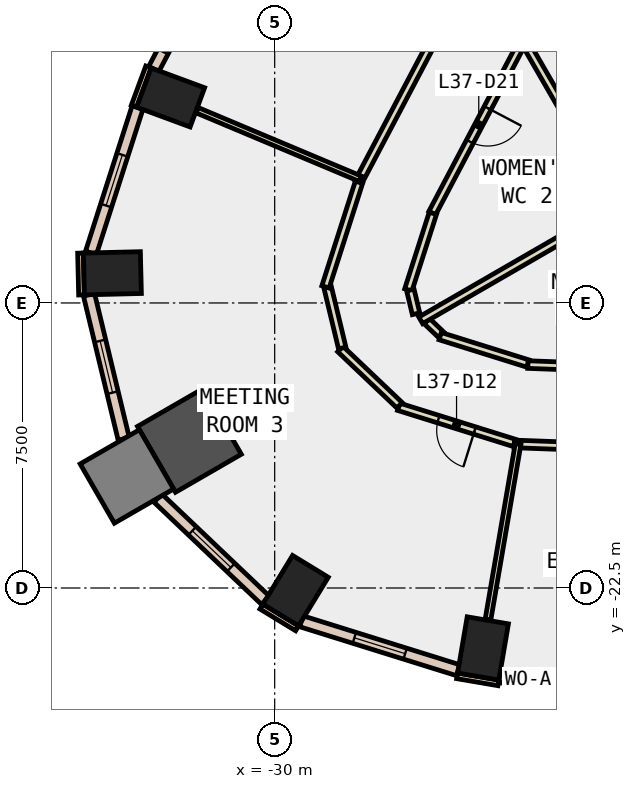
"""IFC4 building model, lengths in metres.
Left out: names, types, materials, properties, quantities, classifications, styles, units other than length and angle.
Written with IfcOpenShell. Run it as: python <this file> out.ifc"""

import sys

from ifc_helpers import new_model, si_unit, direction, frame, frame_2d, origin, origin_2d, place, context, subcontext, project, spatial, rectangle, extrude, element, fill, save


model = new_model("IFC4")
c1 = context("Model", 3, precision=1e-05, world=origin(), true_north=direction((0.0, 1.0)))
c2 = subcontext(c1, "Body", "Model", "MODEL_VIEW")
j1 = project(units=[si_unit("LENGTHUNIT", "METRE"), si_unit("PLANEANGLEUNIT", "RADIAN")], contexts=[c1])
p1 = place(None, origin())
s1 = spatial("IfcSite", under=j1, at=p1, CompositionType="ELEMENT")
p2 = place(p1, origin())
s2 = spatial("IfcBuilding", under=s1, at=p2, CompositionType="ELEMENT")
p3 = place(p2, frame((0.0, 0.0, 167.6)))
s3 = spatial("IfcBuildingStorey", under=s2, at=p3, CompositionType="ELEMENT", Elevation=167.6)
for number, where, z_axis, x_axis in (
    (1, (-24.518, -24.09, -0.4), (0.0, 0.0, 1.0), (-0.986, 0.168, 0.0)),
    (2, (-32.738, -9.593, -0.4), (0.0, 0.0, 1.0), (0.347, 0.938, 0.0)),
    (3, (-34.271, -14.219, -0.4), (0.0, 0.0, 1.0), (-0.024, 1.0, 0.0)),
):
    element("IfcColumn", number, at=place(p3, frame(where, z_axis=z_axis, x_axis=x_axis)), inside=s3, PredefinedType="COLUMN", context=c2, shape_type="SweptSolid", body=[
        extrude(rectangle(XDim=1.1, YDim=1.5, at=origin_2d()), origin(), (0.0, 0.0, 1.0), 4.2),
    ])
p4 = place(p3, frame((-32.244, -18.615, -0.4), z_axis=(0.0, 0.0, 1.0), x_axis=(0.866025403784, 0.5, 0.0)))
e4 = element("IfcColumn", 4, at=p4, inside=s3, PredefinedType="COLUMN", context=c2, shape_type="SweptSolid", body=[
    extrude(rectangle(XDim=2.0, YDim=2.0, at=origin_2d()), origin(), (0.0, 0.0, 1.0), 4.2),
])
p5 = place(p3, frame((-29.45, -22.571, -0.4), z_axis=(0.0, 0.0, 1.0), x_axis=(-0.853714435155, 0.520741455243, 0.0)))
e5 = element("IfcColumn", 5, at=p5, inside=s3, PredefinedType="COLUMN", context=c2, shape_type="SweptSolid", body=[
    extrude(rectangle(XDim=1.1, YDim=1.5, at=origin_2d()), origin(), (0.0, 0.0, 1.0), 4.2),
])
p6 = place(p3, frame((-33.889, -19.565, -0.4), z_axis=(0.0, 0.0, 1.0), x_axis=(0.866025403784, 0.5, 0.0)))
e6 = element("IfcColumn", 6, at=p6, inside=s3, PredefinedType="COLUMN", context=c2, shape_type="SweptSolid", body=[
    extrude(rectangle(XDim=1.8, YDim=1.8, at=origin_2d()), origin(), (0.0, 0.0, 1.0), 4.2),
])
p7 = place(p3, frame((-33.321, -8.791, 0.0), z_axis=(0.0, 0.0, 1.0), x_axis=(-0.346229846278, -0.938149718087, 0.0)))
e7 = element("IfcWall", 7, at=p7, inside=s3, PredefinedType="STANDARD", context=c2, shape_type="SweptSolid", body=[
    extrude(rectangle(XDim=1.1, YDim=0.15, at=frame_2d((0.55, 0.0))), origin(), (0.0, 0.0, 1.0), 3.8),
])
p8 = place(p3, frame((-25.199, -24.811, 0.0), z_axis=(0.0, 0.0, 1.0), x_axis=(0.985763338892, -0.168138751323, 0.0)))
e8 = element("IfcWall", 8, at=p8, inside=s3, PredefinedType="STANDARD", context=c2, shape_type="SweptSolid", body=[
    extrude(rectangle(XDim=1.101, YDim=0.15, at=frame_2d((0.55, 0.0))), origin(), (0.0, 0.0, 1.0), 3.8),
])
p9 = place(p3, frame((-35.109, -13.689, 0.0), z_axis=(0.0, 0.0, 1.0), x_axis=(0.023517683673, -0.999723421029, 0.0)))
e9 = element("IfcWall", 9, at=p9, inside=s3, PredefinedType="STANDARD", context=c2, shape_type="SweptSolid", body=[
    extrude(rectangle(XDim=1.1, YDim=0.15, at=frame_2d((0.55, 0.0))), origin(), (0.0, 0.0, 1.0), 3.8),
])
p10 = place(p3, frame((-30.349, -22.989, 0.0), z_axis=(0.0, 0.0, 1.0), x_axis=(0.854065628997, -0.520165263514, 0.0)))
e10 = element("IfcWall", 10, at=p10, inside=s3, PredefinedType="STANDARD", context=c2, shape_type="SweptSolid", body=[
    extrude(rectangle(XDim=1.1, YDim=0.15, at=frame_2d((0.55, 0.0))), origin(), (0.0, 0.0, 1.0), 3.8),
])
p11 = place(p3, frame((-24.09, -24.848, 0.0), z_axis=(0.0, 0.0, 1.0), x_axis=(0.999307730926, -0.037202942236, 0.0)))
e11 = element("IfcWall", 11, at=p11, inside=s3, PredefinedType="STANDARD", context=c2, shape_type="SweptSolid", body=[
    extrude(rectangle(XDim=7.317, YDim=0.3, at=frame_2d((3.659, 0.0))), origin(), (0.0, 0.0, 1.0), 3.8),
])
p12 = place(p11, frame((0.629, 0.0, 0.9)))
e12 = element("IfcOpeningElement", 12, at=p12, cuts=e11, PredefinedType="OPENING", context=c2, shape_type="SweptSolid", body=[
    extrude(rectangle(XDim=2.4, YDim=2.6, at=frame_2d((1.2, 1.3))), frame((0.0, 0.16, 0.0), z_axis=(0.0, -1.0, 0.0), x_axis=(1.0, 0.0, 0.0)), (0.0, 0.0, 1.0), 0.32),
])
p13 = place(p11, frame((4.288, 0.0, 0.9)))
e13 = element("IfcOpeningElement", 13, at=p13, cuts=e11, PredefinedType="OPENING", context=c2, shape_type="SweptSolid", body=[
    extrude(rectangle(XDim=2.4, YDim=2.6, at=frame_2d((1.2, 1.3))), frame((0.0, 0.16, 0.0), z_axis=(0.0, -1.0, 0.0), x_axis=(1.0, 0.0, 0.0)), (0.0, 0.0, 1.0), 0.32),
])
p14 = place(p3, frame((-30.358, -3.488, 0.0), z_axis=(0.0, 0.0, 1.0), x_axis=(-0.466399410196, -0.884574242316, 0.0)))
e14 = element("IfcWall", 14, at=p14, inside=s3, PredefinedType="STANDARD", context=c2, shape_type="SweptSolid", body=[
    extrude(rectangle(XDim=6.055, YDim=0.3, at=frame_2d((3.027, 0.0))), origin(), (0.0, 0.0, 1.0), 3.8),
])
p15 = place(p14, frame((0.514, 0.0, 0.9)))
e15 = element("IfcOpeningElement", 15, at=p15, cuts=e14, PredefinedType="OPENING", context=c2, shape_type="SweptSolid", body=[
    extrude(rectangle(XDim=2.0, YDim=2.6, at=frame_2d((1.0, 1.3))), frame((0.0, 0.16, 0.0), z_axis=(0.0, -1.0, 0.0), x_axis=(1.0, 0.0, 0.0)), (0.0, 0.0, 1.0), 0.32),
])
p16 = place(p14, frame((3.541, 0.0, 0.9)))
e16 = element("IfcOpeningElement", 16, at=p16, cuts=e14, PredefinedType="OPENING", context=c2, shape_type="SweptSolid", body=[
    extrude(rectangle(XDim=2.0, YDim=2.6, at=frame_2d((1.0, 1.3))), frame((0.0, 0.16, 0.0), z_axis=(0.0, -1.0, 0.0), x_axis=(1.0, 0.0, 0.0)), (0.0, 0.0, 1.0), 0.32),
])
p17 = place(p3, frame((-33.609, -9.856, 0.0), z_axis=(0.0, 0.0, 1.0), x_axis=(-0.305018133869, -0.952346543025, 0.0)))
e17 = element("IfcWall", 17, at=p17, inside=s3, PredefinedType="STANDARD", context=c2, shape_type="SweptSolid", body=[
    extrude(rectangle(XDim=4.02, YDim=0.3, at=frame_2d((2.01, 0.0))), origin(), (0.0, 0.0, 1.0), 3.8),
])
p18 = place(p17, frame((1.31, 0.0, 0.9)))
e18 = element("IfcOpeningElement", 18, at=p18, cuts=e17, PredefinedType="OPENING", context=c2, shape_type="SweptSolid", body=[
    extrude(rectangle(XDim=1.4, YDim=2.6, at=frame_2d((0.7, 1.3))), frame((0.0, 0.16, 0.0), z_axis=(0.0, -1.0, 0.0), x_axis=(1.0, 0.0, 0.0)), (0.0, 0.0, 1.0), 0.32),
])
p19 = place(p3, frame((-34.886, -14.783, 0.0), z_axis=(0.0, 0.0, 1.0), x_axis=(0.234102046927, -0.972212030179, 0.0)))
e19 = element("IfcWall", 19, at=p19, inside=s3, PredefinedType="STANDARD", context=c2, shape_type="SweptSolid", body=[
    extrude(rectangle(XDim=3.9, YDim=0.3, at=frame_2d((1.95, 0.0))), origin(), (0.0, 0.0, 1.0), 3.8),
])
p20 = place(p19, frame((1.25, 0.0, 0.9)))
e20 = element("IfcOpeningElement", 20, at=p20, cuts=e19, PredefinedType="OPENING", context=c2, shape_type="SweptSolid", body=[
    extrude(rectangle(XDim=1.4, YDim=2.6, at=frame_2d((0.7, 1.3))), frame((0.0, 0.16, 0.0), z_axis=(0.0, -1.0, 0.0), x_axis=(1.0, 0.0, 0.0)), (0.0, 0.0, 1.0), 0.32),
])
p21 = place(p3, frame((-33.074, -20.133, 0.0), z_axis=(0.0, 0.0, 1.0), x_axis=(0.724807239831, -0.688951714628, 0.0)))
e21 = element("IfcWall", 21, at=p21, inside=s3, PredefinedType="STANDARD", context=c2, shape_type="SweptSolid", body=[
    extrude(rectangle(XDim=3.902, YDim=0.3, at=frame_2d((1.951, 0.0))), origin(), (0.0, 0.0, 1.0), 3.8),
])
p22 = place(p21, frame((1.251, 0.0, 0.9)))
e22 = element("IfcOpeningElement", 22, at=p22, cuts=e21, PredefinedType="OPENING", context=c2, shape_type="SweptSolid", body=[
    extrude(rectangle(XDim=1.4, YDim=2.6, at=frame_2d((0.7, 1.3))), frame((0.0, 0.16, 0.0), z_axis=(0.0, -1.0, 0.0), x_axis=(1.0, 0.0, 0.0)), (0.0, 0.0, 1.0), 0.32),
])
p23 = place(p3, frame((-29.298, -23.376, 0.0), z_axis=(0.0, 0.0, 1.0), x_axis=(0.954628614874, -0.29779893832, 0.0)))
e23 = element("IfcWall", 23, at=p23, inside=s3, PredefinedType="STANDARD", context=c2, shape_type="SweptSolid", body=[
    extrude(rectangle(XDim=4.322, YDim=0.3, at=frame_2d((2.161, 0.0))), origin(), (0.0, 0.0, 1.0), 3.8),
])
p24 = place(p23, frame((1.461, 0.0, 0.9)))
e24 = element("IfcOpeningElement", 24, at=p24, cuts=e23, PredefinedType="OPENING", context=c2, shape_type="SweptSolid", body=[
    extrude(rectangle(XDim=1.4, YDim=2.6, at=frame_2d((0.7, 1.3))), frame((0.0, 0.16, 0.0), z_axis=(0.0, -1.0, 0.0), x_axis=(1.0, 0.0, 0.0)), (0.0, 0.0, 1.0), 0.32),
])
p25 = place(p3, frame((-23.406, -7.991, 0.0), z_axis=(0.0, 0.0, 1.0), x_axis=(-0.466307932558, -0.884622468646, 0.0)))
e25 = element("IfcWall", 25, at=p25, inside=s3, PredefinedType="PARTITIONING", context=c2, shape_type="SweptSolid", body=[
    extrude(rectangle(XDim=5.25, YDim=0.2, at=frame_2d((2.625, 0.0))), origin(), (0.0, 0.0, 1.0), 3.8),
])
p26 = place(p25, frame((2.125, 0.0, 0.0)))
e26 = element("IfcOpeningElement", 26, at=p26, cuts=e25, PredefinedType="OPENING", context=c2, shape_type="SweptSolid", body=[
    extrude(rectangle(XDim=1.0, YDim=2.1, at=frame_2d((0.5, 1.05))), frame((0.0, 0.11, 0.0), z_axis=(0.0, -1.0, 0.0), x_axis=(1.0, 0.0, 0.0)), (0.0, 0.0, 1.0), 0.22),
])
p27 = place(p3, frame((-25.838, -12.642, 0.0), z_axis=(0.0, 0.0, 1.0), x_axis=(-0.305169069368, -0.952298188122, 0.0)))
e27 = element("IfcWall", 27, at=p27, inside=s3, PredefinedType="PARTITIONING", context=c2, shape_type="SweptSolid", body=[
    extrude(rectangle(XDim=2.117, YDim=0.2, at=frame_2d((1.059, 0.0))), origin(), (0.0, 0.0, 1.0), 3.8),
])
p28 = place(p3, frame((-26.43, -14.66, 0.0), z_axis=(0.0, 0.0, 1.0), x_axis=(0.233574377125, -0.972338938, 0.0)))
e28 = element("IfcWall", 28, at=p28, inside=s3, PredefinedType="PARTITIONING", context=c2, shape_type="SweptSolid", body=[
    extrude(rectangle(XDim=0.642, YDim=0.2, at=frame_2d((0.321, 0.0))), origin(), (0.0, 0.0, 1.0), 3.8),
])
p29 = place(p3, frame((-25.998, -15.476, 0.0), z_axis=(0.0, 0.0, 1.0), x_axis=(0.724294499657, -0.689490737985, 0.0)))
e29 = element("IfcWall", 29, at=p29, inside=s3, PredefinedType="PARTITIONING", context=c2, shape_type="SweptSolid", body=[
    extrude(rectangle(XDim=0.519, YDim=0.2, at=frame_2d((0.26, 0.0))), origin(), (0.0, 0.0, 1.0), 3.8),
])
p30 = place(p3, frame((-25.645, -15.873, 0.0), z_axis=(0.0, 0.0, 1.0), x_axis=(0.95454810771, -0.298056890655, 0.0)))
e30 = element("IfcWall", 30, at=p30, inside=s3, PredefinedType="PARTITIONING", context=c2, shape_type="SweptSolid", body=[
    extrude(rectangle(XDim=2.422, YDim=0.2, at=frame_2d((1.211, 0.0))), origin(), (0.0, 0.0, 1.0), 3.8),
])
p31 = place(p3, frame((-23.337, -16.621, 0.0), z_axis=(0.0, 0.0, 1.0), x_axis=(0.999311710526, -0.037095892019, 0.0)))
e31 = element("IfcWall", 31, at=p31, inside=s3, PredefinedType="PARTITIONING", context=c2, shape_type="SweptSolid", body=[
    extrude(rectangle(XDim=4.824, YDim=0.2, at=frame_2d((2.412, 0.0))), origin(), (0.0, 0.0, 1.0), 3.8),
])
p32 = place(p31, frame((1.913, 0.0, 0.0)))
e32 = element("IfcOpeningElement", 32, at=p32, cuts=e31, PredefinedType="OPENING", context=c2, shape_type="SweptSolid", body=[
    extrude(rectangle(XDim=1.0, YDim=2.1, at=frame_2d((0.5, 1.05))), frame((0.0, 0.11, 0.0), z_axis=(0.0, -1.0, 0.0), x_axis=(1.0, 0.0, 0.0)), (0.0, 0.0, 1.0), 0.22),
])
p33 = place(p3, frame((-27.798, -11.819, 0.0), z_axis=(0.0, 0.0, 1.0), x_axis=(0.466450727507, 0.884547182918, 0.0)))
e33 = element("IfcWall", 33, at=p33, inside=s3, PredefinedType="PARTITIONING", context=c2, shape_type="SweptSolid", body=[
    extrude(rectangle(XDim=6.685, YDim=0.2, at=frame_2d((3.342, 0.0))), origin(), (0.0, 0.0, 1.0), 3.8),
])
p34 = place(p3, frame((-23.691, -18.683, 0.0), z_axis=(0.0, 0.0, 1.0), x_axis=(-0.954546657381, 0.298061535398, 0.0)))
e34 = element("IfcWall", 34, at=p34, inside=s3, PredefinedType="PARTITIONING", context=c2, shape_type="SweptSolid", body=[
    extrude(rectangle(XDim=3.191, YDim=0.2, at=frame_2d((1.596, 0.0))), origin(), (0.0, 0.0, 1.0), 3.8),
])
p35 = place(p34, frame((1.096, 0.0, 0.0)))
e35 = element("IfcOpeningElement", 35, at=p35, cuts=e34, PredefinedType="OPENING", context=c2, shape_type="SweptSolid", body=[
    extrude(rectangle(XDim=1.0, YDim=2.1, at=frame_2d((0.5, 1.05))), frame((0.0, 0.11, 0.0), z_axis=(0.0, -1.0, 0.0), x_axis=(1.0, 0.0, 0.0)), (0.0, 0.0, 1.0), 0.22),
])
p36 = place(p3, frame((-26.714, -17.693, 0.0), z_axis=(0.0, 0.0, 1.0), x_axis=(-0.724712974479, 0.689050872303, 0.0)))
e36 = element("IfcWall", 36, at=p36, inside=s3, PredefinedType="PARTITIONING", context=c2, shape_type="SweptSolid", body=[
    extrude(rectangle(XDim=2.15, YDim=0.2, at=frame_2d((1.075, 0.0))), origin(), (0.0, 0.0, 1.0), 3.8),
])
p37 = place(p3, frame((-28.223, -16.184, 0.0), z_axis=(0.0, 0.0, 1.0), x_axis=(-0.233826017197, 0.972278454807, 0.0)))
e37 = element("IfcWall", 37, at=p37, inside=s3, PredefinedType="PARTITIONING", context=c2, shape_type="SweptSolid", body=[
    extrude(rectangle(XDim=1.651, YDim=0.2, at=frame_2d((0.825, 0.0))), origin(), (0.0, 0.0, 1.0), 3.8),
])
p38 = place(p3, frame((-28.663, -14.577, 0.0), z_axis=(0.0, 0.0, 1.0), x_axis=(0.304925942137, 0.952376065329, 0.0)))
e38 = element("IfcWall", 38, at=p38, inside=s3, PredefinedType="PARTITIONING", context=c2, shape_type="SweptSolid", body=[
    extrude(rectangle(XDim=2.89, YDim=0.2, at=frame_2d((1.445, 0.0))), origin(), (0.0, 0.0, 1.0), 3.8),
])
p39 = place(p3, frame((-15.974, -18.995, 0.0), z_axis=(0.0, 0.0, 1.0), x_axis=(-0.999314011084, 0.037033866276, 0.0)))
e39 = element("IfcWall", 39, at=p39, inside=s3, PredefinedType="PARTITIONING", context=c2, shape_type="SweptSolid", body=[
    extrude(rectangle(XDim=7.726, YDim=0.2, at=frame_2d((3.863, 0.0))), origin(), (0.0, 0.0, 1.0), 3.8),
])
p40 = place(p39, frame((3.363, 0.0, 0.0)))
e40 = element("IfcOpeningElement", 40, at=p40, cuts=e39, PredefinedType="OPENING", context=c2, shape_type="SweptSolid", body=[
    extrude(rectangle(XDim=1.0, YDim=2.1, at=frame_2d((0.5, 1.05))), frame((0.0, 0.11, 0.0), z_axis=(0.0, -1.0, 0.0), x_axis=(1.0, 0.0, 0.0)), (0.0, 0.0, 1.0), 0.22),
])
p41 = place(p3, frame((-20.986, -12.351, 0.0), z_axis=(0.0, 0.0, 1.0), x_axis=(-0.499993851206, 0.866028953763, 0.0)))
e41 = element("IfcWall", 41, at=p41, inside=s3, PredefinedType="PARTITIONING", context=c2, shape_type="SweptSolid", body=[
    extrude(rectangle(XDim=4.932, YDim=0.2, at=frame_2d((2.466, 0.0))), origin(), (0.0, 0.0, 1.0), 3.8),
])
p42 = place(p3, frame((-21.021, -12.491, 0.0), z_axis=(0.0, 0.0, 1.0), x_axis=(-0.865966890845, -0.500101333692, 0.0)))
e42 = element("IfcWall", 42, at=p42, inside=s3, PredefinedType="PARTITIONING", context=c2, shape_type="SweptSolid", body=[
    extrude(rectangle(XDim=5.931, YDim=0.2, at=frame_2d((2.965, 0.0))), origin(), (0.0, 0.0, 1.0), 3.8),
])
p43 = place(p3, frame((-27.751, -11.73, 0.0), z_axis=(0.0, 0.0, 1.0), x_axis=(-0.92196786851, 0.387266380462, 0.0)))
e43 = element("IfcWall", 43, at=p43, inside=s3, PredefinedType="PARTITIONING", context=c2, shape_type="SweptSolid", body=[
    extrude(rectangle(XDim=4.653, YDim=0.15, at=frame_2d((2.327, 0.0))), origin(), (0.0, 0.0, 1.0), 3.8),
])
p44 = place(p3, frame((-23.595, -18.712, 0.0), z_axis=(0.0, 0.0, 1.0), x_axis=(-0.168992733164, -0.985617296996, 0.0)))
e44 = element("IfcWall", 44, at=p44, inside=s3, PredefinedType="PARTITIONING", context=c2, shape_type="SweptSolid", body=[
    extrude(rectangle(XDim=4.687, YDim=0.15, at=frame_2d((2.343, 0.0))), origin(), (0.0, 0.0, 1.0), 3.8),
])
p45 = place(p12, origin())
e45 = element("IfcWindow", 45, at=p45, inside=s3, PartitioningType="SINGLE_PANEL", PredefinedType="WINDOW", context=c2, shape_type="SweptSolid", body=[
    extrude(rectangle(XDim=2.4, YDim=2.6, at=frame_2d((1.2, 1.3))), frame((0.0, 0.03, 0.0), z_axis=(0.0, -1.0, 0.0), x_axis=(1.0, 0.0, 0.0)), (0.0, 0.0, 1.0), 0.06),
])
fill(e12, e45)
p46 = place(p16, origin())
e46 = element("IfcWindow", 46, at=p46, inside=s3, PartitioningType="SINGLE_PANEL", PredefinedType="WINDOW", context=c2, shape_type="SweptSolid", body=[
    extrude(rectangle(XDim=2.0, YDim=2.6, at=frame_2d((1.0, 1.3))), frame((0.0, 0.03, 0.0), z_axis=(0.0, -1.0, 0.0), x_axis=(1.0, 0.0, 0.0)), (0.0, 0.0, 1.0), 0.06),
])
fill(e16, e46)
p47 = place(p18, origin())
e47 = element("IfcWindow", 47, at=p47, inside=s3, PartitioningType="SINGLE_PANEL", PredefinedType="WINDOW", context=c2, shape_type="SweptSolid", body=[
    extrude(rectangle(XDim=1.4, YDim=2.6, at=frame_2d((0.7, 1.3))), frame((0.0, 0.03, 0.0), z_axis=(0.0, -1.0, 0.0), x_axis=(1.0, 0.0, 0.0)), (0.0, 0.0, 1.0), 0.06),
])
fill(e18, e47)
p48 = place(p20, origin())
e48 = element("IfcWindow", 48, at=p48, inside=s3, PartitioningType="SINGLE_PANEL", PredefinedType="WINDOW", context=c2, shape_type="SweptSolid", body=[
    extrude(rectangle(XDim=1.4, YDim=2.6, at=frame_2d((0.7, 1.3))), frame((0.0, 0.03, 0.0), z_axis=(0.0, -1.0, 0.0), x_axis=(1.0, 0.0, 0.0)), (0.0, 0.0, 1.0), 0.06),
])
fill(e20, e48)
p49 = place(p22, origin())
e49 = element("IfcWindow", 49, at=p49, inside=s3, PartitioningType="SINGLE_PANEL", PredefinedType="WINDOW", context=c2, shape_type="SweptSolid", body=[
    extrude(rectangle(XDim=1.4, YDim=2.6, at=frame_2d((0.7, 1.3))), frame((0.0, 0.03, 0.0), z_axis=(0.0, -1.0, 0.0), x_axis=(1.0, 0.0, 0.0)), (0.0, 0.0, 1.0), 0.06),
])
fill(e22, e49)
p50 = place(p24, origin())
e50 = element("IfcWindow", 50, at=p50, inside=s3, PartitioningType="SINGLE_PANEL", PredefinedType="WINDOW", context=c2, shape_type="SweptSolid", body=[
    extrude(rectangle(XDim=1.4, YDim=2.6, at=frame_2d((0.7, 1.3))), frame((0.0, 0.03, 0.0), z_axis=(0.0, -1.0, 0.0), x_axis=(1.0, 0.0, 0.0)), (0.0, 0.0, 1.0), 0.06),
])
fill(e24, e50)
p51 = place(p35, origin())
e51 = element("IfcDoor", 51, at=p51, inside=s3, OperationType="SINGLE_SWING_LEFT", PredefinedType="DOOR", context=c2, shape_type="SweptSolid", body=[
    extrude(rectangle(XDim=1.0, YDim=2.1, at=frame_2d((0.5, 1.05))), frame((0.0, 0.025, 0.0), z_axis=(0.0, -1.0, 0.0), x_axis=(1.0, 0.0, 0.0)), (0.0, 0.0, 1.0), 0.05),
])
fill(e35, e51)
p52 = place(p26, origin())
e52 = element("IfcDoor", 52, at=p52, inside=s3, OperationType="SINGLE_SWING_LEFT", PredefinedType="DOOR", context=c2, shape_type="SweptSolid", body=[
    extrude(rectangle(XDim=1.0, YDim=2.1, at=frame_2d((0.5, 1.05))), frame((0.0, 0.025, 0.0), z_axis=(0.0, -1.0, 0.0), x_axis=(1.0, 0.0, 0.0)), (0.0, 0.0, 1.0), 0.05),
])
fill(e26, e52)
save(model, sys.argv[1])
